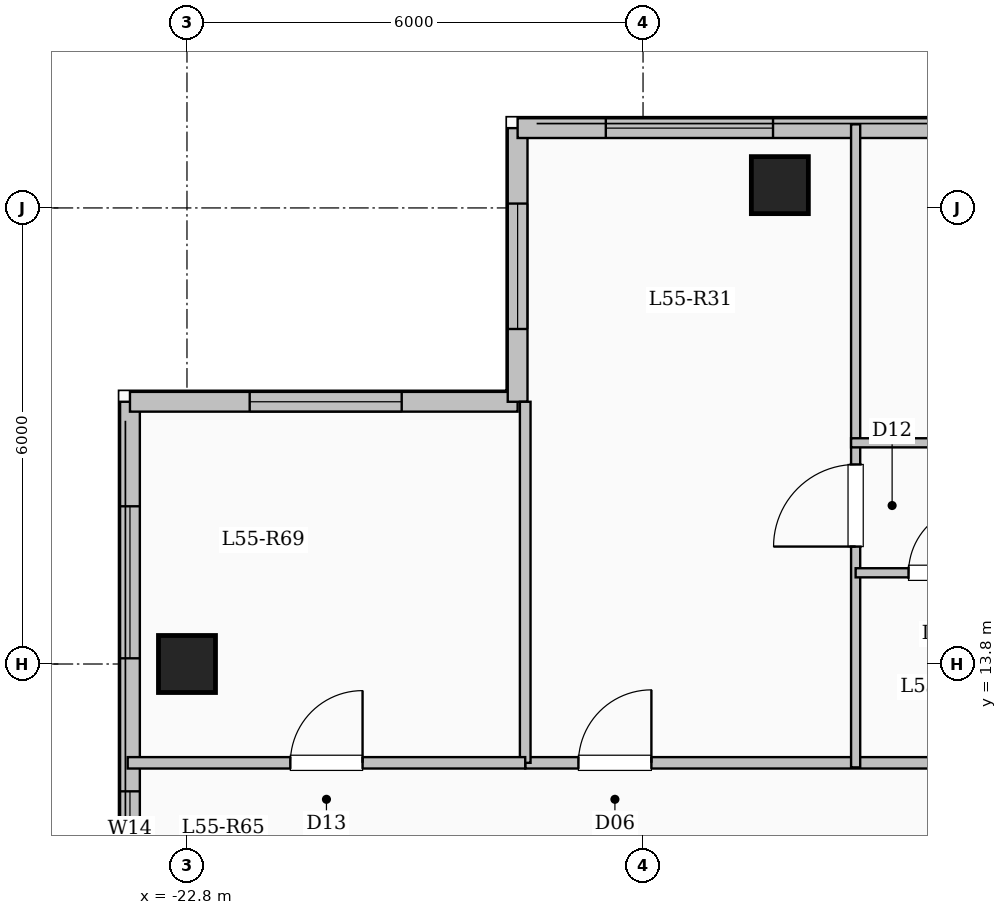
"""IFC4 building model, lengths in metres.
Left out: names, types, materials, properties, quantities, classifications, styles, units other than length and angle.
Written with IfcOpenShell. Run it as: python <this file> out.ifc"""

import sys

from ifc_helpers import new_model, si_unit, direction, frame, frame_2d, origin, origin_2d, place, context, subcontext, project, spatial, rectangle, extrude, element, fill, save


model = new_model("IFC4")
c1 = context("Model", 3, precision=1e-05, world=origin(), true_north=direction((0.0, 1.0)))
c2 = subcontext(c1, "Body", "Model", "MODEL_VIEW")
j1 = project(units=[si_unit("LENGTHUNIT", "METRE"), si_unit("PLANEANGLEUNIT", "RADIAN")], contexts=[c1])
p1 = place(None, origin())
s1 = spatial("IfcSite", under=j1, at=p1, CompositionType="ELEMENT")
p2 = place(p1, origin())
s2 = spatial("IfcBuilding", under=s1, at=p2, CompositionType="ELEMENT")
p3 = place(p2, frame((0.0, 0.0, 203.65)))
s3 = spatial("IfcBuildingStorey", under=s2, at=p3, CompositionType="ELEMENT", Elevation=203.65)
for number, where, z_axis, x_axis in (
    (1, (-15.0, 20.1, 0.0), (0.0, 0.0, 1.0), (1.0, 0.0, 0.0)),
    (2, (-22.8, 13.8, 0.0), (0.0, 0.0, 1.0), (1.0, 0.0, 0.0)),
):
    element("IfcColumn", number, at=place(p3, frame(where, z_axis=z_axis, x_axis=x_axis)), inside=s3, PredefinedType="COLUMN", context=c2, shape_type="SweptSolid", body=[
        extrude(rectangle(XDim=0.75, YDim=0.75, at=origin_2d()), origin(), (0.0, 0.0, 1.0), 3.35),
    ])
p4 = place(p3, frame((-23.55, -17.25, 0.0), z_axis=(0.0, 0.0, 1.0), x_axis=(0.0, 1.0, 0.0)))
e3 = element("IfcWall", 3, at=p4, inside=s3, PredefinedType="SOLIDWALL", context=c2, shape_type="SweptSolid", body=[
    extrude(rectangle(XDim=34.5, YDim=0.26, at=frame_2d((17.25, 0.0))), origin(), (0.0, 0.0, 1.0), 3.1),
])
p5 = place(p4, frame((2.825, 0.0, 0.9)))
e4 = element("IfcOpeningElement", 4, at=p5, cuts=e3, PredefinedType="OPENING", context=c2, shape_type="SweptSolid", body=[
    extrude(rectangle(XDim=2.2, YDim=1.75, at=frame_2d((1.1, 0.875))), frame((0.0, 0.14, 0.0), z_axis=(0.0, -1.0, 0.0), x_axis=(1.0, 0.0, 0.0)), (0.0, 0.0, 1.0), 0.28),
])
p6 = place(p4, frame((8.325, 0.0, 0.95)))
e5 = element("IfcOpeningElement", 5, at=p6, cuts=e3, PredefinedType="OPENING", context=c2, shape_type="SweptSolid", body=[
    extrude(rectangle(XDim=1.2, YDim=1.5, at=frame_2d((0.6, 0.75))), frame((0.0, 0.14, 0.0), z_axis=(0.0, -1.0, 0.0), x_axis=(1.0, 0.0, 0.0)), (0.0, 0.0, 1.0), 0.28),
])
p7 = place(p4, frame((13.25, 0.0, 0.9)))
e6 = element("IfcOpeningElement", 6, at=p7, cuts=e3, PredefinedType="OPENING", context=c2, shape_type="SweptSolid", body=[
    extrude(rectangle(XDim=2.2, YDim=1.75, at=frame_2d((1.1, 0.875))), frame((0.0, 0.14, 0.0), z_axis=(0.0, -1.0, 0.0), x_axis=(1.0, 0.0, 0.0)), (0.0, 0.0, 1.0), 0.28),
])
p8 = place(p4, frame((19.65, 0.0, 0.9)))
e7 = element("IfcOpeningElement", 7, at=p8, cuts=e3, PredefinedType="OPENING", context=c2, shape_type="SweptSolid", body=[
    extrude(rectangle(XDim=1.65, YDim=1.6, at=frame_2d((0.825, 0.8))), frame((0.0, 0.14, 0.0), z_axis=(0.0, -1.0, 0.0), x_axis=(1.0, 0.0, 0.0)), (0.0, 0.0, 1.0), 0.28),
])
p9 = place(p4, frame((24.125, 0.0, 0.9)))
e8 = element("IfcOpeningElement", 8, at=p9, cuts=e3, PredefinedType="OPENING", context=c2, shape_type="SweptSolid", body=[
    extrude(rectangle(XDim=2.0, YDim=1.7, at=frame_2d((1.0, 0.85))), frame((0.0, 0.14, 0.0), z_axis=(0.0, -1.0, 0.0), x_axis=(1.0, 0.0, 0.0)), (0.0, 0.0, 1.0), 0.28),
])
p10 = place(p4, frame((28.375, 0.0, 0.95)))
e9 = element("IfcOpeningElement", 9, at=p10, cuts=e3, PredefinedType="OPENING", context=c2, shape_type="SweptSolid", body=[
    extrude(rectangle(XDim=1.0, YDim=1.5, at=frame_2d((0.5, 0.75))), frame((0.0, 0.14, 0.0), z_axis=(0.0, -1.0, 0.0), x_axis=(1.0, 0.0, 0.0)), (0.0, 0.0, 1.0), 0.28),
])
p11 = place(p4, frame((31.125, 0.0, 0.9)))
e10 = element("IfcOpeningElement", 10, at=p11, cuts=e3, PredefinedType="OPENING", context=c2, shape_type="SweptSolid", body=[
    extrude(rectangle(XDim=2.0, YDim=1.7, at=frame_2d((1.0, 0.85))), frame((0.0, 0.14, 0.0), z_axis=(0.0, -1.0, 0.0), x_axis=(1.0, 0.0, 0.0)), (0.0, 0.0, 1.0), 0.28),
])
p12 = place(p3, frame((-23.55, 17.25, 0.0), z_axis=(0.0, 0.0, 1.0), x_axis=(1.0, 0.0, 0.0)))
e11 = element("IfcWall", 11, at=p12, inside=s3, PredefinedType="SOLIDWALL", context=c2, shape_type="SweptSolid", body=[
    extrude(rectangle(XDim=5.1, YDim=0.26, at=frame_2d((2.55, 0.0))), origin(), (0.0, 0.0, 1.0), 3.1),
])
p13 = place(p12, frame((1.575, 0.0, 0.9)))
e12 = element("IfcOpeningElement", 12, at=p13, cuts=e11, PredefinedType="OPENING", context=c2, shape_type="SweptSolid", body=[
    extrude(rectangle(XDim=2.0, YDim=1.7, at=frame_2d((1.0, 0.85))), frame((0.0, 0.14, 0.0), z_axis=(0.0, -1.0, 0.0), x_axis=(1.0, 0.0, 0.0)), (0.0, 0.0, 1.0), 0.28),
])
p14 = place(p3, frame((-18.45, 17.25, 0.0), z_axis=(0.0, 0.0, 1.0), x_axis=(0.0, 1.0, 0.0)))
e13 = element("IfcWall", 13, at=p14, inside=s3, PredefinedType="SOLIDWALL", context=c2, shape_type="SweptSolid", body=[
    extrude(rectangle(XDim=3.6, YDim=0.26, at=frame_2d((1.8, 0.0))), origin(), (0.0, 0.0, 1.0), 3.1),
])
p15 = place(p14, frame((0.958, 0.0, 0.9)))
e14 = element("IfcOpeningElement", 14, at=p15, cuts=e13, PredefinedType="OPENING", context=c2, shape_type="SweptSolid", body=[
    extrude(rectangle(XDim=1.65, YDim=1.6, at=frame_2d((0.825, 0.8))), frame((0.0, 0.14, 0.0), z_axis=(0.0, -1.0, 0.0), x_axis=(1.0, 0.0, 0.0)), (0.0, 0.0, 1.0), 0.28),
])
p16 = place(p3, frame((-18.45, 20.85, 0.0), z_axis=(0.0, 0.0, 1.0), x_axis=(1.0, 0.0, 0.0)))
e15 = element("IfcWall", 15, at=p16, inside=s3, PredefinedType="SOLIDWALL", context=c2, shape_type="SweptSolid", body=[
    extrude(rectangle(XDim=11.1, YDim=0.26, at=frame_2d((5.55, 0.0))), origin(), (0.0, 0.0, 1.0), 3.1),
])
p17 = place(p16, frame((1.16, 0.0, 0.9)))
e16 = element("IfcOpeningElement", 16, at=p17, cuts=e15, PredefinedType="OPENING", context=c2, shape_type="SweptSolid", body=[
    extrude(rectangle(XDim=2.2, YDim=1.75, at=frame_2d((1.1, 0.875))), frame((0.0, 0.14, 0.0), z_axis=(0.0, -1.0, 0.0), x_axis=(1.0, 0.0, 0.0)), (0.0, 0.0, 1.0), 0.28),
])
p18 = place(p16, frame((5.805, 0.0, 0.9)))
e17 = element("IfcOpeningElement", 17, at=p18, cuts=e15, PredefinedType="OPENING", context=c2, shape_type="SweptSolid", body=[
    extrude(rectangle(XDim=1.65, YDim=1.6, at=frame_2d((0.825, 0.8))), frame((0.0, 0.14, 0.0), z_axis=(0.0, -1.0, 0.0), x_axis=(1.0, 0.0, 0.0)), (0.0, 0.0, 1.0), 0.28),
])
p19 = place(p16, frame((9.42, 0.0, 0.95)))
e18 = element("IfcOpeningElement", 18, at=p19, cuts=e15, PredefinedType="OPENING", context=c2, shape_type="SweptSolid", body=[
    extrude(rectangle(XDim=1.2, YDim=1.5, at=frame_2d((0.6, 0.75))), frame((0.0, 0.14, 0.0), z_axis=(0.0, -1.0, 0.0), x_axis=(1.0, 0.0, 0.0)), (0.0, 0.0, 1.0), 0.28),
])
p20 = place(p3, frame((-18.35, 12.5, 0.0), z_axis=(0.0, 0.0, 1.0), x_axis=(1.0, 0.0, 0.0)))
e19 = element("IfcWall", 19, at=p20, inside=s3, PredefinedType="PARTITIONING", context=c2, shape_type="SweptSolid", body=[
    extrude(rectangle(XDim=14.5, YDim=0.15, at=frame_2d((7.25, 0.0))), origin(), (0.0, 0.0, 1.0), 3.1),
])
p21 = place(p20, frame((0.7, 0.0, 0.0)))
e20 = element("IfcOpeningElement", 20, at=p21, cuts=e19, PredefinedType="OPENING", context=c2, shape_type="SweptSolid", body=[
    extrude(rectangle(XDim=0.96, YDim=2.15, at=frame_2d((0.48, 1.075))), frame((0.0, 0.085, 0.0), z_axis=(0.0, -1.0, 0.0), x_axis=(1.0, 0.0, 0.0)), (0.0, 0.0, 1.0), 0.17),
])
p22 = place(p20, frame((9.394, 0.0, 0.0)))
e21 = element("IfcOpeningElement", 21, at=p22, cuts=e19, PredefinedType="OPENING", context=c2, shape_type="SweptSolid", body=[
    extrude(rectangle(XDim=0.96, YDim=2.15, at=frame_2d((0.48, 1.075))), frame((0.0, 0.085, 0.0), z_axis=(0.0, -1.0, 0.0), x_axis=(1.0, 0.0, 0.0)), (0.0, 0.0, 1.0), 0.17),
])
p23 = place(p3, frame((-14.003, 12.44, 0.0), z_axis=(0.0, 0.0, 1.0), x_axis=(0.0, 1.0, 0.0)))
e22 = element("IfcWall", 22, at=p23, inside=s3, PredefinedType="PARTITIONING", context=c2, shape_type="SweptSolid", body=[
    extrude(rectangle(XDim=8.46, YDim=0.12, at=frame_2d((4.23, 0.0))), origin(), (0.0, 0.0, 1.0), 3.1),
])
p24 = place(p23, frame((2.905, 0.0, 0.0)))
e23 = element("IfcOpeningElement", 23, at=p24, cuts=e22, PredefinedType="OPENING", context=c2, shape_type="SweptSolid", body=[
    extrude(rectangle(XDim=1.08, YDim=2.15, at=frame_2d((0.54, 1.075))), frame((0.0, 0.07, 0.0), z_axis=(0.0, -1.0, 0.0), x_axis=(1.0, 0.0, 0.0)), (0.0, 0.0, 1.0), 0.14),
])
p25 = place(p3, frame((-14.003, 15.0, 0.0), z_axis=(0.0, 0.0, 1.0), x_axis=(1.0, 0.0, 0.0)))
e24 = element("IfcWall", 24, at=p25, inside=s3, PredefinedType="PARTITIONING", context=c2, shape_type="SweptSolid", body=[
    extrude(rectangle(XDim=2.272, YDim=0.12, at=frame_2d((1.136, 0.0))), origin(), (0.0, 0.0, 1.0), 3.1),
])
p26 = place(p25, frame((0.696, 0.0, 0.0)))
e25 = element("IfcOpeningElement", 25, at=p26, cuts=e24, PredefinedType="OPENING", context=c2, shape_type="SweptSolid", body=[
    extrude(rectangle(XDim=0.88, YDim=2.1, at=frame_2d((0.44, 1.05))), frame((0.0, 0.07, 0.0), z_axis=(0.0, -1.0, 0.0), x_axis=(1.0, 0.0, 0.0)), (0.0, 0.0, 1.0), 0.14),
])
p27 = place(p3, frame((-14.063, 16.71, 0.0), z_axis=(0.0, 0.0, 1.0), x_axis=(1.0, 0.0, 0.0)))
e26 = element("IfcWall", 26, at=p27, inside=s3, PredefinedType="PARTITIONING", context=c2, shape_type="SweptSolid", body=[
    extrude(rectangle(XDim=4.467, YDim=0.12, at=frame_2d((2.233, 0.0))), origin(), (0.0, 0.0, 1.0), 2.725),
])
p28 = place(p27, frame((1.703, 0.0, 0.0)))
e27 = element("IfcOpeningElement", 27, at=p28, cuts=e26, PredefinedType="OPENING", context=c2, shape_type="SweptSolid", body=[
    extrude(rectangle(XDim=0.88, YDim=2.1, at=frame_2d((0.44, 1.05))), frame((0.0, 0.07, 0.0), z_axis=(0.0, -1.0, 0.0), x_axis=(1.0, 0.0, 0.0)), (0.0, 0.0, 1.0), 0.14),
])
p29 = place(p3, frame((-18.35, 12.5, 0.0), z_axis=(0.0, 0.0, 1.0), x_axis=(0.0, 1.0, 0.0)))
e28 = element("IfcWall", 28, at=p29, inside=s3, PredefinedType="PARTITIONING", context=c2, shape_type="SweptSolid", body=[
    extrude(rectangle(XDim=4.75, YDim=0.14, at=frame_2d((2.375, 0.0))), origin(), (0.0, 0.0, 1.0), 3.1),
])
p30 = place(p3, frame((-23.58, 12.5, 0.0), z_axis=(0.0, 0.0, 1.0), x_axis=(1.0, 0.0, 0.0)))
e29 = element("IfcWall", 29, at=p30, inside=s3, PredefinedType="PARTITIONING", context=c2, shape_type="SweptSolid", body=[
    extrude(rectangle(XDim=5.23, YDim=0.15, at=frame_2d((2.615, 0.0))), origin(), (0.0, 0.0, 1.0), 3.1),
])
p31 = place(p30, frame((2.14, 0.0, 0.0)))
e30 = element("IfcOpeningElement", 30, at=p31, cuts=e29, PredefinedType="OPENING", context=c2, shape_type="SweptSolid", body=[
    extrude(rectangle(XDim=0.95, YDim=2.15, at=frame_2d((0.475, 1.075))), frame((0.0, 0.085, 0.0), z_axis=(0.0, -1.0, 0.0), x_axis=(1.0, 0.0, 0.0)), (0.0, 0.0, 1.0), 0.17),
])
p32 = place(p10, origin())
e31 = element("IfcWindow", 31, at=p32, inside=s3, PartitioningType="SINGLE_PANEL", PredefinedType="WINDOW", context=c2, shape_type="SweptSolid", body=[
    extrude(rectangle(XDim=1.0, YDim=1.5, at=frame_2d((0.5, 0.75))), frame((0.0, 0.03, 0.0), z_axis=(0.0, -1.0, 0.0), x_axis=(1.0, 0.0, 0.0)), (0.0, 0.0, 1.0), 0.06),
])
fill(e9, e31)
p33 = place(p11, origin())
e32 = element("IfcWindow", 32, at=p33, inside=s3, PartitioningType="SINGLE_PANEL", PredefinedType="WINDOW", context=c2, shape_type="SweptSolid", body=[
    extrude(rectangle(XDim=2.0, YDim=1.7, at=frame_2d((1.0, 0.85))), frame((0.0, 0.03, 0.0), z_axis=(0.0, -1.0, 0.0), x_axis=(1.0, 0.0, 0.0)), (0.0, 0.0, 1.0), 0.06),
])
fill(e10, e32)
p34 = place(p13, origin())
e33 = element("IfcWindow", 33, at=p34, inside=s3, PartitioningType="SINGLE_PANEL", PredefinedType="WINDOW", context=c2, shape_type="SweptSolid", body=[
    extrude(rectangle(XDim=2.0, YDim=1.7, at=frame_2d((1.0, 0.85))), frame((0.0, 0.03, 0.0), z_axis=(0.0, -1.0, 0.0), x_axis=(1.0, 0.0, 0.0)), (0.0, 0.0, 1.0), 0.06),
])
fill(e12, e33)
p35 = place(p15, origin())
e34 = element("IfcWindow", 34, at=p35, inside=s3, PartitioningType="SINGLE_PANEL", PredefinedType="WINDOW", context=c2, shape_type="SweptSolid", body=[
    extrude(rectangle(XDim=1.65, YDim=1.6, at=frame_2d((0.825, 0.8))), frame((0.0, 0.03, 0.0), z_axis=(0.0, -1.0, 0.0), x_axis=(1.0, 0.0, 0.0)), (0.0, 0.0, 1.0), 0.06),
])
fill(e14, e34)
p36 = place(p17, origin())
e35 = element("IfcWindow", 35, at=p36, inside=s3, PartitioningType="SINGLE_PANEL", PredefinedType="WINDOW", context=c2, shape_type="SweptSolid", body=[
    extrude(rectangle(XDim=2.2, YDim=1.75, at=frame_2d((1.1, 0.875))), frame((0.0, 0.03, 0.0), z_axis=(0.0, -1.0, 0.0), x_axis=(1.0, 0.0, 0.0)), (0.0, 0.0, 1.0), 0.06),
])
fill(e16, e35)
p37 = place(p21, origin())
e36 = element("IfcDoor", 36, at=p37, inside=s3, OperationType="SINGLE_SWING_RIGHT", PredefinedType="DOOR", context=c2, shape_type="SweptSolid", body=[
    extrude(rectangle(XDim=0.96, YDim=2.15, at=frame_2d((0.48, 1.075))), frame((0.0, 0.025, 0.0), z_axis=(0.0, -1.0, 0.0), x_axis=(1.0, 0.0, 0.0)), (0.0, 0.0, 1.0), 0.05),
])
fill(e20, e36)
p38 = place(p24, origin())
e37 = element("IfcDoor", 37, at=p38, inside=s3, OperationType="SINGLE_SWING_LEFT", PredefinedType="DOOR", context=c2, shape_type="SweptSolid", body=[
    extrude(rectangle(XDim=1.08, YDim=2.15, at=frame_2d((0.54, 1.075))), frame((0.0, 0.025, 0.0), z_axis=(0.0, -1.0, 0.0), x_axis=(1.0, 0.0, 0.0)), (0.0, 0.0, 1.0), 0.05),
])
fill(e23, e37)
p39 = place(p26, origin())
e38 = element("IfcDoor", 38, at=p39, inside=s3, OperationType="SINGLE_SWING_RIGHT", PredefinedType="DOOR", context=c2, shape_type="SweptSolid", body=[
    extrude(rectangle(XDim=0.88, YDim=2.1, at=frame_2d((0.44, 1.05))), frame((0.0, 0.025, 0.0), z_axis=(0.0, -1.0, 0.0), x_axis=(1.0, 0.0, 0.0)), (0.0, 0.0, 1.0), 0.05),
])
fill(e25, e38)
p40 = place(p31, origin())
e39 = element("IfcDoor", 39, at=p40, inside=s3, OperationType="SINGLE_SWING_RIGHT", PredefinedType="DOOR", context=c2, shape_type="SweptSolid", body=[
    extrude(rectangle(XDim=0.95, YDim=2.15, at=frame_2d((0.475, 1.075))), frame((0.0, 0.025, 0.0), z_axis=(0.0, -1.0, 0.0), x_axis=(1.0, 0.0, 0.0)), (0.0, 0.0, 1.0), 0.05),
])
fill(e30, e39)
save(model, sys.argv[1])
